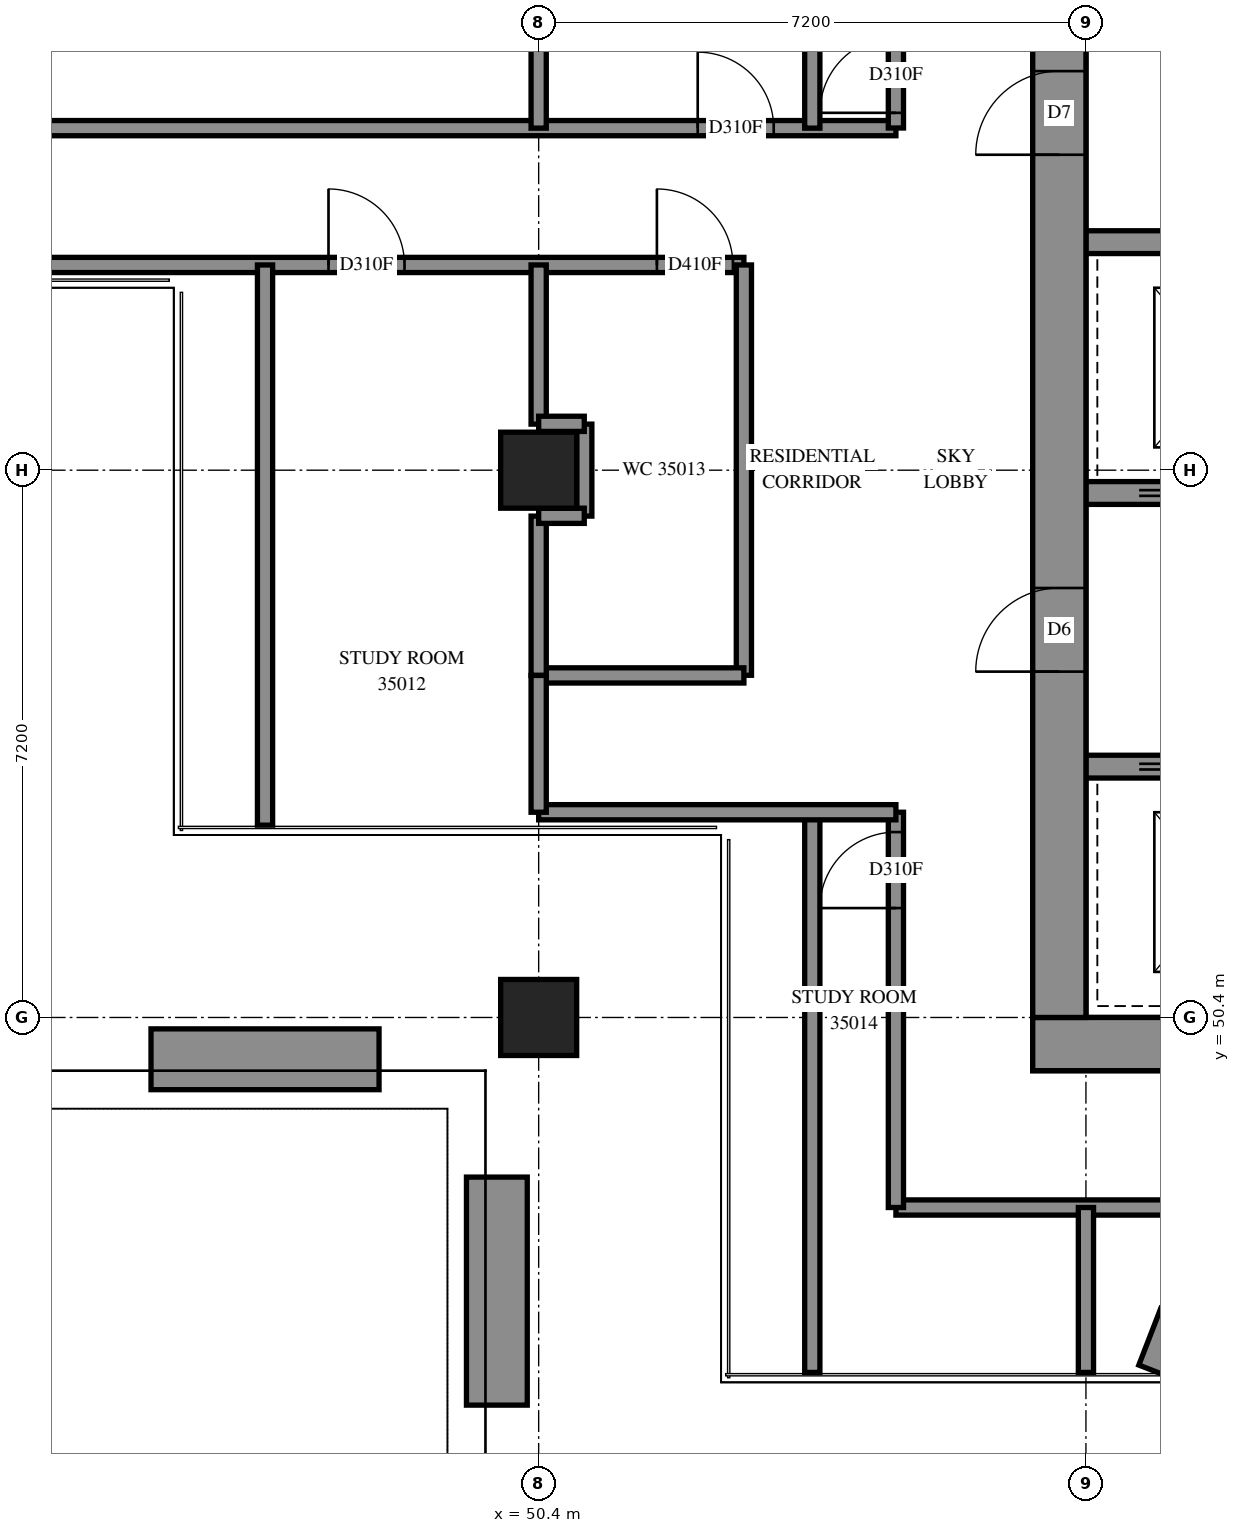
"""IFC4 building model, lengths in metres.
Left out: names, types, materials, properties, quantities, classifications, styles, units other than length and angle.
Written with IfcOpenShell. Run it as: python <this file> out.ifc"""

import sys

from ifc_helpers import new_model, si_unit, direction, frame, frame_2d, origin, origin_2d, place, context, subcontext, project, spatial, rectangle, extrude, element, fill, save


model = new_model("IFC4")
c1 = context("Model", 3, precision=1e-05, world=origin(), true_north=direction((0.0, 1.0)))
c2 = subcontext(c1, "Body", "Model", "MODEL_VIEW")
j1 = project(units=[si_unit("LENGTHUNIT", "METRE"), si_unit("PLANEANGLEUNIT", "RADIAN")], contexts=[c1])
p1 = place(None, origin())
s1 = spatial("IfcSite", under=j1, at=p1, CompositionType="ELEMENT")
p2 = place(p1, origin())
s2 = spatial("IfcBuilding", under=s1, at=p2, CompositionType="ELEMENT")
p3 = place(p2, frame((0.0, 0.0, 131.2)))
s3 = spatial("IfcBuildingStorey", under=s2, at=p3, CompositionType="ELEMENT", Elevation=131.2)
for number, where, z_axis, x_axis in (
    (1, (50.4, 50.4, 0.0), (0.0, 0.0, 1.0), (1.0, 0.0, 0.0)),
    (2, (50.4, 57.6, 0.0), (0.0, 0.0, 1.0), (1.0, 0.0, 0.0)),
):
    element("IfcColumn", number, at=place(p3, frame(where, z_axis=z_axis, x_axis=x_axis)), inside=s3, PredefinedType="COLUMN", context=c2, shape_type="SweptSolid", body=[
        extrude(rectangle(XDim=1.0, YDim=1.0, at=origin_2d()), origin(), (0.0, 0.0, 1.0), 3.9),
    ])
p4 = place(p3, frame((56.9, 50.05, -0.3), z_axis=(0.0, 0.0, 1.0), x_axis=(1.0, 0.0, 0.0)))
e3 = element("IfcWall", 3, at=p4, inside=s3, PredefinedType="SHEAR", context=c2, shape_type="SweptSolid", body=[
    extrude(rectangle(XDim=15.8, YDim=0.7, at=frame_2d((7.9, 0.0))), origin(), (0.0, 0.0, 1.0), 3.5),
])
p5 = place(p3, frame((57.25, 50.4, -0.3), z_axis=(0.0, 0.0, 1.0), x_axis=(0.0, 1.0, 0.0)))
e4 = element("IfcWall", 4, at=p5, inside=s3, PredefinedType="SHEAR", context=c2, shape_type="SweptSolid", body=[
    extrude(rectangle(XDim=14.4, YDim=0.7, at=frame_2d((7.2, 0.0))), origin(), (0.0, 0.0, 1.0), 3.5),
])
p6 = place(p5, frame((4.55, 0.0, 0.3)))
e5 = element("IfcOpeningElement", 5, at=p6, cuts=e4, PredefinedType="OPENING", context=c2, shape_type="SweptSolid", body=[
    extrude(rectangle(XDim=1.1, YDim=2.1, at=frame_2d((0.55, 1.05))), frame((0.0, 0.36, 0.0), z_axis=(0.0, -1.0, 0.0), x_axis=(1.0, 0.0, 0.0)), (0.0, 0.0, 1.0), 0.72),
])
p7 = place(p5, frame((11.35, 0.0, 0.3)))
e6 = element("IfcOpeningElement", 6, at=p7, cuts=e4, PredefinedType="OPENING", context=c2, shape_type="SweptSolid", body=[
    extrude(rectangle(XDim=1.1, YDim=2.1, at=frame_2d((0.55, 1.05))), frame((0.0, 0.36, 0.0), z_axis=(0.0, -1.0, 0.0), x_axis=(1.0, 0.0, 0.0)), (0.0, 0.0, 1.0), 0.72),
])
p8 = place(p3, frame((57.6, 53.7, 0.0), z_axis=(0.0, 0.0, 1.0), x_axis=(1.0, 0.0, 0.0)))
e7 = element("IfcWall", 7, at=p8, inside=s3, PredefinedType="SOLIDWALL", context=c2, shape_type="SweptSolid", body=[
    extrude(rectangle(XDim=14.4, YDim=0.3, at=frame_2d((7.2, 0.0))), origin(), (0.0, 0.0, 1.0), 3.9),
])
p9 = place(p8, frame((1.25, 0.0, 0.0)))
e8 = element("IfcOpeningElement", 8, at=p9, cuts=e7, PredefinedType="OPENING", context=c2, shape_type="SweptSolid", body=[
    extrude(rectangle(XDim=1.1, YDim=2.1, at=frame_2d((0.55, 1.05))), frame((0.0, 0.16, 0.0), z_axis=(0.0, -1.0, 0.0), x_axis=(1.0, 0.0, 0.0)), (0.0, 0.0, 1.0), 0.32),
])
p10 = place(p8, frame((4.85, 0.0, 0.0)))
e9 = element("IfcOpeningElement", 9, at=p10, cuts=e7, PredefinedType="OPENING", context=c2, shape_type="SweptSolid", body=[
    extrude(rectangle(XDim=1.1, YDim=2.1, at=frame_2d((0.55, 1.05))), frame((0.0, 0.16, 0.0), z_axis=(0.0, -1.0, 0.0), x_axis=(1.0, 0.0, 0.0)), (0.0, 0.0, 1.0), 0.32),
])
p11 = place(p8, frame((8.45, 0.0, 0.0)))
e10 = element("IfcOpeningElement", 10, at=p11, cuts=e7, PredefinedType="OPENING", context=c2, shape_type="SweptSolid", body=[
    extrude(rectangle(XDim=1.1, YDim=2.1, at=frame_2d((0.55, 1.05))), frame((0.0, 0.16, 0.0), z_axis=(0.0, -1.0, 0.0), x_axis=(1.0, 0.0, 0.0)), (0.0, 0.0, 1.0), 0.32),
])
p12 = place(p8, frame((12.05, 0.0, 0.0)))
e11 = element("IfcOpeningElement", 11, at=p12, cuts=e7, PredefinedType="OPENING", context=c2, shape_type="SweptSolid", body=[
    extrude(rectangle(XDim=1.1, YDim=2.1, at=frame_2d((0.55, 1.05))), frame((0.0, 0.16, 0.0), z_axis=(0.0, -1.0, 0.0), x_axis=(1.0, 0.0, 0.0)), (0.0, 0.0, 1.0), 0.32),
])
p13 = place(p3, frame((57.6, 57.3, 0.0), z_axis=(0.0, 0.0, 1.0), x_axis=(1.0, 0.0, 0.0)))
e12 = element("IfcWall", 12, at=p13, inside=s3, PredefinedType="SOLIDWALL", context=c2, shape_type="SweptSolid", body=[
    extrude(rectangle(XDim=14.4, YDim=0.3, at=frame_2d((7.2, 0.0))), origin(), (0.0, 0.0, 1.0), 3.9),
])
p14 = place(p13, frame((1.25, 0.0, 0.0)))
e13 = element("IfcOpeningElement", 13, at=p14, cuts=e12, PredefinedType="OPENING", context=c2, shape_type="SweptSolid", body=[
    extrude(rectangle(XDim=1.1, YDim=2.1, at=frame_2d((0.55, 1.05))), frame((0.0, 0.16, 0.0), z_axis=(0.0, -1.0, 0.0), x_axis=(1.0, 0.0, 0.0)), (0.0, 0.0, 1.0), 0.32),
])
p15 = place(p13, frame((4.85, 0.0, 0.0)))
e14 = element("IfcOpeningElement", 14, at=p15, cuts=e12, PredefinedType="OPENING", context=c2, shape_type="SweptSolid", body=[
    extrude(rectangle(XDim=1.1, YDim=2.1, at=frame_2d((0.55, 1.05))), frame((0.0, 0.16, 0.0), z_axis=(0.0, -1.0, 0.0), x_axis=(1.0, 0.0, 0.0)), (0.0, 0.0, 1.0), 0.32),
])
p16 = place(p13, frame((8.45, 0.0, 0.0)))
e15 = element("IfcOpeningElement", 15, at=p16, cuts=e12, PredefinedType="OPENING", context=c2, shape_type="SweptSolid", body=[
    extrude(rectangle(XDim=1.1, YDim=2.1, at=frame_2d((0.55, 1.05))), frame((0.0, 0.16, 0.0), z_axis=(0.0, -1.0, 0.0), x_axis=(1.0, 0.0, 0.0)), (0.0, 0.0, 1.0), 0.32),
])
p17 = place(p13, frame((12.05, 0.0, 0.0)))
e16 = element("IfcOpeningElement", 16, at=p17, cuts=e12, PredefinedType="OPENING", context=c2, shape_type="SweptSolid", body=[
    extrude(rectangle(XDim=1.1, YDim=2.1, at=frame_2d((0.55, 1.05))), frame((0.0, 0.16, 0.0), z_axis=(0.0, -1.0, 0.0), x_axis=(1.0, 0.0, 0.0)), (0.0, 0.0, 1.0), 0.32),
])
p18 = place(p3, frame((57.6, 60.6, 0.0), z_axis=(0.0, 0.0, 1.0), x_axis=(1.0, 0.0, 0.0)))
e17 = element("IfcWall", 17, at=p18, inside=s3, PredefinedType="SOLIDWALL", context=c2, shape_type="SweptSolid", body=[
    extrude(rectangle(XDim=7.2, YDim=0.3, at=frame_2d((3.6, 0.0))), origin(), (0.0, 0.0, 1.0), 3.9),
])
for number, where, z_axis, x_axis in (
    (18, (45.3, 49.85, 0.0), (0.0, 0.0, 1.0), (1.0, 0.0, 0.0)),
    (19, (49.85, 48.3, 0.0), (0.0, 0.0, 1.0), (0.0, -1.0, 0.0)),
):
    element("IfcWall", number, at=place(p3, frame(where, z_axis=z_axis, x_axis=x_axis)), inside=s3, PredefinedType="SOLIDWALL", context=c2, shape_type="SweptSolid", body=[
        extrude(rectangle(XDim=3.0, YDim=0.8, at=frame_2d((1.5, 0.0))), origin(), (0.0, 0.0, 1.0), 0.65),
    ])
p19 = place(p3, frame((62.7, 44.552, 0.0), z_axis=(0.0, 0.0, 1.0), x_axis=(-0.9326237227, 0.3608503732, 0.0)))
e20 = element("IfcWall", 20, at=p19, inside=s3, PredefinedType="SOLIDWALL", context=c2, shape_type="SweptSolid", body=[
    extrude(rectangle(XDim=4.567, YDim=0.8, at=frame_2d((2.284, 0.0))), origin(), (0.0, 0.0, 1.0), 0.65),
])
p20 = place(p3, frame((55.1, 47.9, 0.0), z_axis=(0.0, 0.0, 1.0), x_axis=(1.0, 0.0, 0.0)))
e21 = element("IfcWall", 21, at=p20, inside=s3, PredefinedType="PARTITIONING", context=c2, shape_type="SweptSolid", body=[
    extrude(rectangle(XDim=19.208, YDim=0.2, at=frame_2d((9.604, 0.0))), origin(), (0.0, 0.0, 1.0), 3.9),
])
p21 = place(p3, frame((40.502, 62.1, 0.0), z_axis=(0.0, 0.0, 1.0), x_axis=(1.0, 0.0, 0.0)))
e22 = element("IfcWall", 22, at=p21, inside=s3, PredefinedType="PARTITIONING", context=c2, shape_type="SweptSolid", body=[
    extrude(rectangle(XDim=14.598, YDim=0.2, at=frame_2d((7.299, 0.0))), origin(), (0.0, 0.0, 1.0), 3.9),
])
p22 = place(p21, frame((0.265, 0.0, 0.0)))
e23 = element("IfcOpeningElement", 23, at=p22, cuts=e22, PredefinedType="OPENING", context=c2, shape_type="SweptSolid", body=[
    extrude(rectangle(XDim=1.0, YDim=2.1, at=frame_2d((0.5, 1.05))), frame((0.0, 0.11, 0.0), z_axis=(0.0, -1.0, 0.0), x_axis=(1.0, 0.0, 0.0)), (0.0, 0.0, 1.0), 0.22),
])
p23 = place(p21, frame((11.991, 0.0, 0.0)))
e24 = element("IfcOpeningElement", 24, at=p23, cuts=e22, PredefinedType="OPENING", context=c2, shape_type="SweptSolid", body=[
    extrude(rectangle(XDim=1.0, YDim=2.1, at=frame_2d((0.5, 1.05))), frame((0.0, 0.11, 0.0), z_axis=(0.0, -1.0, 0.0), x_axis=(1.0, 0.0, 0.0)), (0.0, 0.0, 1.0), 0.22),
])
p24 = place(p3, frame((38.53, 60.3, 0.0), z_axis=(0.0, 0.0, 1.0), x_axis=(1.0, 0.0, 0.0)))
e25 = element("IfcWall", 25, at=p24, inside=s3, PredefinedType="PARTITIONING", context=c2, shape_type="SweptSolid", body=[
    extrude(rectangle(XDim=14.57, YDim=0.2, at=frame_2d((7.285, 0.0))), origin(), (0.0, 0.0, 1.0), 3.9),
])
p25 = place(p24, frame((9.105, 0.0, 0.0)))
e26 = element("IfcOpeningElement", 26, at=p25, cuts=e25, PredefinedType="OPENING", context=c2, shape_type="SweptSolid", body=[
    extrude(rectangle(XDim=1.0, YDim=2.1, at=frame_2d((0.5, 1.05))), frame((0.0, 0.11, 0.0), z_axis=(0.0, -1.0, 0.0), x_axis=(1.0, 0.0, 0.0)), (0.0, 0.0, 1.0), 0.22),
])
p26 = place(p24, frame((13.426, 0.0, 0.0)))
e27 = element("IfcOpeningElement", 27, at=p26, cuts=e25, PredefinedType="OPENING", context=c2, shape_type="SweptSolid", body=[
    extrude(rectangle(XDim=1.0, YDim=2.1, at=frame_2d((0.5, 1.05))), frame((0.0, 0.11, 0.0), z_axis=(0.0, -1.0, 0.0), x_axis=(1.0, 0.0, 0.0)), (0.0, 0.0, 1.0), 0.22),
])
for number, where, z_axis, x_axis in (
    (28, (54.0, 45.73, 0.0), (0.0, 0.0, 1.0), (0.0, 1.0, 0.0)),
    (29, (46.8, 52.93, 0.0), (0.0, 0.0, 1.0), (0.0, 1.0, 0.0)),
    (30, (54.0, 62.1, 0.0), (0.0, 0.0, 1.0), (0.0, 1.0, 0.0)),
):
    element("IfcWall", number, at=place(p3, frame(where, z_axis=z_axis, x_axis=x_axis)), inside=s3, PredefinedType="PARTITIONING", context=c2, shape_type="SweptSolid", body=[
        extrude(rectangle(XDim=7.37, YDim=0.2, at=frame_2d((3.685, 0.0))), origin(), (0.0, 0.0, 1.0), 3.9),
    ])
p27 = place(p3, frame((53.1, 54.902, 0.0), z_axis=(0.0, 0.0, 1.0), x_axis=(0.0, 1.0, 0.0)))
e31 = element("IfcWall", 31, at=p27, inside=s3, PredefinedType="PARTITIONING", context=c2, shape_type="SweptSolid", body=[
    extrude(rectangle(XDim=5.398, YDim=0.2, at=frame_2d((2.699, 0.0))), origin(), (0.0, 0.0, 1.0), 3.9),
])
p28 = place(p3, frame((55.1, 47.9, 0.0), z_axis=(0.0, 0.0, 1.0), x_axis=(0.0, 1.0, 0.0)))
e32 = element("IfcWall", 32, at=p28, inside=s3, PredefinedType="PARTITIONING", context=c2, shape_type="SweptSolid", body=[
    extrude(rectangle(XDim=5.2, YDim=0.2, at=frame_2d((2.6, 0.0))), origin(), (0.0, 0.0, 1.0), 3.9),
])
p29 = place(p28, frame((3.939, 0.0, 0.0)))
e33 = element("IfcOpeningElement", 33, at=p29, cuts=e32, PredefinedType="OPENING", context=c2, shape_type="SweptSolid", body=[
    extrude(rectangle(XDim=1.0, YDim=2.1, at=frame_2d((0.5, 1.05))), frame((0.0, 0.11, 0.0), z_axis=(0.0, -1.0, 0.0), x_axis=(1.0, 0.0, 0.0)), (0.0, 0.0, 1.0), 0.22),
])
p30 = place(p3, frame((55.1, 62.102, 0.0), z_axis=(0.0, 0.0, 1.0), x_axis=(0.0, 1.0, 0.0)))
e34 = element("IfcWall", 34, at=p30, inside=s3, PredefinedType="PARTITIONING", context=c2, shape_type="SweptSolid", body=[
    extrude(rectangle(XDim=5.196, YDim=0.2, at=frame_2d((2.598, 0.0))), origin(), (0.0, 0.0, 1.0), 3.9),
])
p31 = place(p30, frame((0.199, 0.0, 0.0)))
e35 = element("IfcOpeningElement", 35, at=p31, cuts=e34, PredefinedType="OPENING", context=c2, shape_type="SweptSolid", body=[
    extrude(rectangle(XDim=1.0, YDim=2.1, at=frame_2d((0.5, 1.05))), frame((0.0, 0.11, 0.0), z_axis=(0.0, -1.0, 0.0), x_axis=(1.0, 0.0, 0.0)), (0.0, 0.0, 1.0), 0.22),
])
p32 = place(p3, frame((50.4, 53.1, 0.0), z_axis=(0.0, 0.0, 1.0), x_axis=(1.0, 0.0, 0.0)))
e36 = element("IfcWall", 36, at=p32, inside=s3, PredefinedType="PARTITIONING", context=c2, shape_type="SweptSolid", body=[
    extrude(rectangle(XDim=4.7, YDim=0.2, at=frame_2d((2.35, 0.0))), origin(), (0.0, 0.0, 1.0), 3.9),
])
p33 = place(p3, frame((50.4, 54.9, 0.0), z_axis=(0.0, 0.0, 1.0), x_axis=(1.0, 0.0, 0.0)))
e37 = element("IfcWall", 37, at=p33, inside=s3, PredefinedType="PARTITIONING", context=c2, shape_type="SweptSolid", body=[
    extrude(rectangle(XDim=2.7, YDim=0.2, at=frame_2d((1.35, 0.0))), origin(), (0.0, 0.0, 1.0), 3.9),
])
p34 = place(p3, frame((50.4, 62.1, 0.0), z_axis=(0.0, 0.0, 1.0), x_axis=(0.0, 1.0, 0.0)))
e38 = element("IfcWall", 38, at=p34, inside=s3, PredefinedType="PARTITIONING", context=c2, shape_type="SweptSolid", body=[
    extrude(rectangle(XDim=2.2, YDim=0.2, at=frame_2d((1.1, 0.0))), origin(), (0.0, 0.0, 1.0), 3.9),
])
p35 = place(p3, frame((57.6, 45.73, 0.0), z_axis=(0.0, 0.0, 1.0), x_axis=(0.0, 1.0, 0.0)))
e39 = element("IfcWall", 39, at=p35, inside=s3, PredefinedType="PARTITIONING", context=c2, shape_type="SweptSolid", body=[
    extrude(rectangle(XDim=2.17, YDim=0.2, at=frame_2d((1.085, 0.0))), origin(), (0.0, 0.0, 1.0), 3.9),
])
p36 = place(p3, frame((50.4, 54.9, 0.0), z_axis=(0.0, 0.0, 1.0), x_axis=(0.0, 1.0, 0.0)))
e40 = element("IfcWall", 40, at=p36, inside=s3, PredefinedType="PARTITIONING", context=c2, shape_type="SweptSolid", body=[
    extrude(rectangle(XDim=2.096, YDim=0.2, at=frame_2d((1.048, 0.0))), origin(), (0.0, 0.0, 1.0), 3.9),
])
p37 = place(p3, frame((50.4, 58.206, 0.0), z_axis=(0.0, 0.0, 1.0), x_axis=(0.0, 1.0, 0.0)))
e41 = element("IfcWall", 41, at=p37, inside=s3, PredefinedType="PARTITIONING", context=c2, shape_type="SweptSolid", body=[
    extrude(rectangle(XDim=2.094, YDim=0.2, at=frame_2d((1.047, 0.0))), origin(), (0.0, 0.0, 1.0), 3.9),
])
p38 = place(p3, frame((50.4, 53.1, 0.0), z_axis=(0.0, 0.0, 1.0), x_axis=(0.0, 1.0, 0.0)))
e42 = element("IfcWall", 42, at=p38, inside=s3, PredefinedType="PARTITIONING", context=c2, shape_type="SweptSolid", body=[
    extrude(rectangle(XDim=1.8, YDim=0.2, at=frame_2d((0.9, 0.0))), origin(), (0.0, 0.0, 1.0), 3.9),
])
p39 = place(p3, frame((51.0, 56.996, 0.0), z_axis=(0.0, 0.0, 1.0), x_axis=(0.0, 1.0, 0.0)))
e43 = element("IfcWall", 43, at=p39, inside=s3, PredefinedType="PARTITIONING", context=c2, shape_type="SweptSolid", body=[
    extrude(rectangle(XDim=1.21, YDim=0.2, at=frame_2d((0.605, 0.0))), origin(), (0.0, 0.0, 1.0), 3.9),
])
for number, where, z_axis, x_axis in (
    (44, (50.4, 58.21, 0.0), (0.0, 0.0, 1.0), (1.0, 0.0, 0.0)),
    (45, (50.4, 57.0, 0.0), (0.0, 0.0, 1.0), (1.0, 0.0, 0.0)),
):
    element("IfcWall", number, at=place(p3, frame(where, z_axis=z_axis, x_axis=x_axis)), inside=s3, PredefinedType="PARTITIONING", context=c2, shape_type="SweptSolid", body=[
        extrude(rectangle(XDim=0.6, YDim=0.2, at=frame_2d((0.3, 0.0))), origin(), (0.0, 0.0, 1.0), 3.9),
    ])
p40 = place(p6, origin())
e46 = element("IfcDoor", 46, at=p40, inside=s3, OperationType="DOUBLE_DOOR_SINGLE_SWING", PredefinedType="DOOR", context=c2, shape_type="SweptSolid", body=[
    extrude(rectangle(XDim=1.1, YDim=2.1, at=frame_2d((0.55, 1.05))), frame((0.0, 0.025, 0.0), z_axis=(0.0, -1.0, 0.0), x_axis=(1.0, 0.0, 0.0)), (0.0, 0.0, 1.0), 0.05),
])
fill(e5, e46)
p41 = place(p7, origin())
e47 = element("IfcDoor", 47, at=p41, inside=s3, OperationType="SINGLE_SWING_LEFT", PredefinedType="DOOR", context=c2, shape_type="SweptSolid", body=[
    extrude(rectangle(XDim=1.1, YDim=2.1, at=frame_2d((0.55, 1.05))), frame((0.0, 0.025, 0.0), z_axis=(0.0, -1.0, 0.0), x_axis=(1.0, 0.0, 0.0)), (0.0, 0.0, 1.0), 0.05),
])
fill(e6, e47)
p42 = place(p25, origin())
e48 = element("IfcDoor", 48, at=p42, inside=s3, OperationType="SINGLE_SWING_RIGHT", PredefinedType="DOOR", context=c2, shape_type="SweptSolid", body=[
    extrude(rectangle(XDim=1.0, YDim=2.1, at=frame_2d((0.5, 1.05))), frame((0.0, 0.025, 0.0), z_axis=(0.0, -1.0, 0.0), x_axis=(1.0, 0.0, 0.0)), (0.0, 0.0, 1.0), 0.05),
])
fill(e26, e48)
p43 = place(p26, origin())
e49 = element("IfcDoor", 49, at=p43, inside=s3, OperationType="SINGLE_SWING_LEFT", PredefinedType="DOOR", context=c2, shape_type="SweptSolid", body=[
    extrude(rectangle(XDim=1.0, YDim=2.1, at=frame_2d((0.5, 1.05))), frame((0.0, 0.025, 0.0), z_axis=(0.0, -1.0, 0.0), x_axis=(1.0, 0.0, 0.0)), (0.0, 0.0, 1.0), 0.05),
])
fill(e27, e49)
p44 = place(p29, origin())
e50 = element("IfcDoor", 50, at=p44, inside=s3, OperationType="SINGLE_SWING_RIGHT", PredefinedType="DOOR", context=c2, shape_type="SweptSolid", body=[
    extrude(rectangle(XDim=1.0, YDim=2.1, at=frame_2d((0.5, 1.05))), frame((0.0, 0.025, 0.0), z_axis=(0.0, -1.0, 0.0), x_axis=(1.0, 0.0, 0.0)), (0.0, 0.0, 1.0), 0.05),
])
fill(e33, e50)
p45 = place(p23, origin())
e51 = element("IfcDoor", 51, at=p45, inside=s3, OperationType="SINGLE_SWING_RIGHT", PredefinedType="DOOR", context=c2, shape_type="SweptSolid", body=[
    extrude(rectangle(XDim=1.0, YDim=2.1, at=frame_2d((0.5, 1.05))), frame((0.0, 0.025, 0.0), z_axis=(0.0, -1.0, 0.0), x_axis=(1.0, 0.0, 0.0)), (0.0, 0.0, 1.0), 0.05),
])
fill(e24, e51)
p46 = place(p31, origin())
e52 = element("IfcDoor", 52, at=p46, inside=s3, OperationType="SINGLE_SWING_LEFT", PredefinedType="DOOR", context=c2, shape_type="SweptSolid", body=[
    extrude(rectangle(XDim=1.0, YDim=2.1, at=frame_2d((0.5, 1.05))), frame((0.0, 0.025, 0.0), z_axis=(0.0, -1.0, 0.0), x_axis=(1.0, 0.0, 0.0)), (0.0, 0.0, 1.0), 0.05),
])
fill(e35, e52)
save(model, sys.argv[1])
